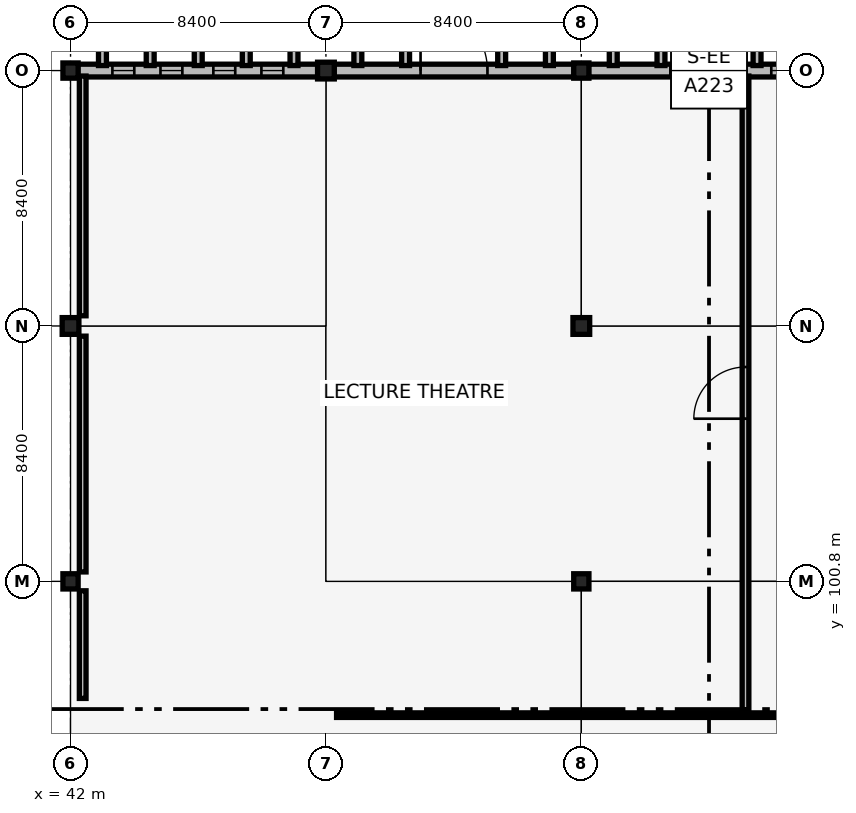
"""IFC4 building model, lengths in metres.
Left out: names, types, materials, properties, quantities, classifications, styles, units other than length and angle.
Written with IfcOpenShell. Run it as: python <this file> out.ifc"""

import sys

from ifc_helpers import new_model, si_unit, direction, frame, frame_2d, origin, origin_2d, place, context, subcontext, project, spatial, rectangle, extrude, element, fill, save


model = new_model("IFC4")
c1 = context("Model", 3, precision=1e-05, world=origin(), true_north=direction((0.0, 1.0)))
c2 = subcontext(c1, "Body", "Model", "MODEL_VIEW")
j1 = project(units=[si_unit("LENGTHUNIT", "METRE"), si_unit("PLANEANGLEUNIT", "RADIAN")], contexts=[c1])
p1 = place(None, origin())
s1 = spatial("IfcSite", under=j1, at=p1, CompositionType="ELEMENT")
p2 = place(p1, origin())
s2 = spatial("IfcBuilding", under=s1, at=p2, CompositionType="ELEMENT")
p3 = place(p2, origin())
s3 = spatial("IfcBuildingStorey", under=s2, at=p3, CompositionType="ELEMENT", Elevation=0.0)
p4 = place(p3, frame((42.0, 100.8, -0.32), z_axis=(0.0, 0.0, 1.0), x_axis=(1.0, 0.0, 0.0)))
e1 = element("IfcColumn", 1, at=p4, inside=s3, PredefinedType="COLUMN", context=c2, shape_type="SweptSolid", body=[
    extrude(rectangle(XDim=0.5, YDim=0.5, at=origin_2d()), origin(), (0.0, 0.0, 1.0), 5.46),
])
p5 = place(p3, frame((42.0, 109.2, -0.32), z_axis=(0.0, 0.0, 1.0), x_axis=(1.0, 0.0, 0.0)))
e2 = element("IfcColumn", 2, at=p5, inside=s3, PredefinedType="COLUMN", context=c2, shape_type="SweptSolid", body=[
    extrude(rectangle(XDim=0.55, YDim=0.55, at=origin_2d()), origin(), (0.0, 0.0, 1.0), 5.46),
])
p6 = place(p3, frame((42.0, 117.6, -0.32), z_axis=(0.0, 0.0, 1.0), x_axis=(1.0, 0.0, 0.0)))
e3 = element("IfcColumn", 3, at=p6, inside=s3, PredefinedType="COLUMN", context=c2, shape_type="SweptSolid", body=[
    extrude(rectangle(XDim=0.5, YDim=0.5, at=origin_2d()), origin(), (0.0, 0.0, 1.0), 5.46),
])
p7 = place(p3, frame((50.4, 117.6, -0.32), z_axis=(0.0, 0.0, 1.0), x_axis=(1.0, 0.0, 0.0)))
e4 = element("IfcColumn", 4, at=p7, inside=s3, PredefinedType="COLUMN", context=c2, shape_type="SweptSolid", body=[
    extrude(rectangle(XDim=0.55, YDim=0.55, at=origin_2d()), origin(), (0.0, 0.0, 1.0), 5.46),
])
p8 = place(p3, frame((58.8, 100.8, -0.32), z_axis=(0.0, 0.0, 1.0), x_axis=(1.0, 0.0, 0.0)))
e5 = element("IfcColumn", 5, at=p8, inside=s3, PredefinedType="COLUMN", context=c2, shape_type="SweptSolid", body=[
    extrude(rectangle(XDim=0.5, YDim=0.5, at=origin_2d()), origin(), (0.0, 0.0, 1.0), 5.46),
])
p9 = place(p3, frame((58.8, 109.2, -0.32), z_axis=(0.0, 0.0, 1.0), x_axis=(1.0, 0.0, 0.0)))
e6 = element("IfcColumn", 6, at=p9, inside=s3, PredefinedType="COLUMN", context=c2, shape_type="SweptSolid", body=[
    extrude(rectangle(XDim=0.55, YDim=0.55, at=origin_2d()), origin(), (0.0, 0.0, 1.0), 5.46),
])
p10 = place(p3, frame((58.8, 117.6, -0.32), z_axis=(0.0, 0.0, 1.0), x_axis=(1.0, 0.0, 0.0)))
e7 = element("IfcColumn", 7, at=p10, inside=s3, PredefinedType="COLUMN", context=c2, shape_type="SweptSolid", body=[
    extrude(rectangle(XDim=0.5, YDim=0.5, at=origin_2d()), origin(), (0.0, 0.0, 1.0), 5.46),
])
p11 = place(p3, frame((42.235, 117.6, 0.0), z_axis=(0.0, 0.0, 1.0), x_axis=(1.0, 0.0, 0.0)))
e8 = element("IfcWall", 8, at=p11, inside=s3, PredefinedType="SOLIDWALL", context=c2, shape_type="SweptSolid", body=[
    extrude(rectangle(XDim=7.905, YDim=0.42, at=frame_2d((3.952, 0.0))), origin(), (0.0, 0.0, 1.0), 4.4),
])
p12 = place(p11, frame((1.142, 0.0, 0.75)))
e9 = element("IfcOpeningElement", 9, at=p12, cuts=e8, PredefinedType="OPENING", context=c2, shape_type="SweptSolid", body=[
    extrude(rectangle(XDim=0.72, YDim=2.6, at=frame_2d((0.36, 1.3))), frame((0.0, 0.22, 0.0), z_axis=(0.0, -1.0, 0.0), x_axis=(1.0, 0.0, 0.0)), (0.0, 0.0, 1.0), 0.44),
])
p13 = place(p11, frame((2.723, 0.0, 0.75)))
e10 = element("IfcOpeningElement", 10, at=p13, cuts=e8, PredefinedType="OPENING", context=c2, shape_type="SweptSolid", body=[
    extrude(rectangle(XDim=0.72, YDim=2.6, at=frame_2d((0.36, 1.3))), frame((0.0, 0.22, 0.0), z_axis=(0.0, -1.0, 0.0), x_axis=(1.0, 0.0, 0.0)), (0.0, 0.0, 1.0), 0.44),
])
p14 = place(p11, frame((4.462, 0.0, 0.75)))
e11 = element("IfcOpeningElement", 11, at=p14, cuts=e8, PredefinedType="OPENING", context=c2, shape_type="SweptSolid", body=[
    extrude(rectangle(XDim=0.72, YDim=2.6, at=frame_2d((0.36, 1.3))), frame((0.0, 0.22, 0.0), z_axis=(0.0, -1.0, 0.0), x_axis=(1.0, 0.0, 0.0)), (0.0, 0.0, 1.0), 0.44),
])
p15 = place(p11, frame((6.043, 0.0, 0.75)))
e12 = element("IfcOpeningElement", 12, at=p15, cuts=e8, PredefinedType="OPENING", context=c2, shape_type="SweptSolid", body=[
    extrude(rectangle(XDim=0.72, YDim=2.6, at=frame_2d((0.36, 1.3))), frame((0.0, 0.22, 0.0), z_axis=(0.0, -1.0, 0.0), x_axis=(1.0, 0.0, 0.0)), (0.0, 0.0, 1.0), 0.44),
])
for number, where, z_axis, x_axis in (
    (13, (43.05, 117.765, -0.32), (0.0, 0.0, 1.0), (0.0, 1.0, 0.0)),
    (14, (44.62, 117.765, -0.32), (0.0, 0.0, 1.0), (0.0, 1.0, 0.0)),
    (15, (46.2, 117.765, -0.32), (0.0, 0.0, 1.0), (0.0, 1.0, 0.0)),
    (16, (47.78, 117.765, -0.32), (0.0, 0.0, 1.0), (0.0, 1.0, 0.0)),
    (17, (49.35, 117.765, -0.32), (0.0, 0.0, 1.0), (0.0, 1.0, 0.0)),
):
    element("IfcWall", number, at=place(p3, frame(where, z_axis=z_axis, x_axis=x_axis)), inside=s3, PredefinedType="SOLIDWALL", context=c2, shape_type="SweptSolid", body=[
        extrude(rectangle(XDim=0.7, YDim=0.26, at=frame_2d((0.35, 0.0))), origin(), (0.0, 0.0, 1.0), 5.76),
    ])
p16 = place(p3, frame((50.66, 117.6, 0.0), z_axis=(0.0, 0.0, 1.0), x_axis=(1.0, 0.0, 0.0)))
e18 = element("IfcWall", 18, at=p16, inside=s3, PredefinedType="SOLIDWALL", context=c2, shape_type="SweptSolid", body=[
    extrude(rectangle(XDim=7.905, YDim=0.42, at=frame_2d((3.953, 0.0))), origin(), (0.0, 0.0, 1.0), 4.4),
])
p17 = place(p16, frame((2.853, 0.0, 0.0)))
e19 = element("IfcOpeningElement", 19, at=p17, cuts=e18, PredefinedType="OPENING", context=c2, shape_type="SweptSolid", body=[
    extrude(rectangle(XDim=2.2, YDim=2.4, at=frame_2d((1.1, 1.2))), frame((0.0, 0.22, 0.0), z_axis=(0.0, -1.0, 0.0), x_axis=(1.0, 0.0, 0.0)), (0.0, 0.0, 1.0), 0.44),
])
for number, where, z_axis, x_axis in (
    (20, (51.45, 117.765, -0.32), (0.0, 0.0, 1.0), (0.0, 1.0, 0.0)),
    (21, (53.02, 117.765, -0.32), (0.0, 0.0, 1.0), (0.0, 1.0, 0.0)),
    (22, (56.18, 117.765, -0.32), (0.0, 0.0, 1.0), (0.0, 1.0, 0.0)),
    (23, (57.75, 117.765, -0.32), (0.0, 0.0, 1.0), (0.0, 1.0, 0.0)),
):
    element("IfcWall", number, at=place(p3, frame(where, z_axis=z_axis, x_axis=x_axis)), inside=s3, PredefinedType="SOLIDWALL", context=c2, shape_type="SweptSolid", body=[
        extrude(rectangle(XDim=0.7, YDim=0.26, at=frame_2d((0.35, 0.0))), origin(), (0.0, 0.0, 1.0), 5.76),
    ])
p18 = place(p3, frame((59.035, 117.6, 0.0), z_axis=(0.0, 0.0, 1.0), x_axis=(1.0, 0.0, 0.0)))
e24 = element("IfcWall", 24, at=p18, inside=s3, PredefinedType="SOLIDWALL", context=c2, shape_type="SweptSolid", body=[
    extrude(rectangle(XDim=7.905, YDim=0.42, at=frame_2d((3.953, 0.0))), origin(), (0.0, 0.0, 1.0), 4.4),
])
p19 = place(p18, frame((2.693, 0.0, 0.75)))
e25 = element("IfcOpeningElement", 25, at=p19, cuts=e24, PredefinedType="OPENING", context=c2, shape_type="SweptSolid", body=[
    extrude(rectangle(XDim=0.78, YDim=2.7, at=frame_2d((0.39, 1.35))), frame((0.0, 0.22, 0.0), z_axis=(0.0, -1.0, 0.0), x_axis=(1.0, 0.0, 0.0)), (0.0, 0.0, 1.0), 0.44),
])
p20 = place(p18, frame((6.013, 0.0, 0.75)))
e26 = element("IfcOpeningElement", 26, at=p20, cuts=e24, PredefinedType="OPENING", context=c2, shape_type="SweptSolid", body=[
    extrude(rectangle(XDim=0.78, YDim=2.7, at=frame_2d((0.39, 1.35))), frame((0.0, 0.22, 0.0), z_axis=(0.0, -1.0, 0.0), x_axis=(1.0, 0.0, 0.0)), (0.0, 0.0, 1.0), 0.44),
])
for number, where, z_axis, x_axis in (
    (27, (59.85, 117.765, -0.32), (0.0, 0.0, 1.0), (0.0, 1.0, 0.0)),
    (28, (61.42, 117.765, -0.32), (0.0, 0.0, 1.0), (0.0, 1.0, 0.0)),
    (29, (63.0, 117.765, -0.32), (0.0, 0.0, 1.0), (0.0, 1.0, 0.0)),
    (30, (64.58, 117.765, -0.32), (0.0, 0.0, 1.0), (0.0, 1.0, 0.0)),
):
    element("IfcWall", number, at=place(p3, frame(where, z_axis=z_axis, x_axis=x_axis)), inside=s3, PredefinedType="SOLIDWALL", context=c2, shape_type="SweptSolid", body=[
        extrude(rectangle(XDim=0.7, YDim=0.26, at=frame_2d((0.35, 0.0))), origin(), (0.0, 0.0, 1.0), 5.76),
    ])
p21 = place(p3, frame((50.75, 96.4, 0.0), z_axis=(0.0, 0.0, 1.0), x_axis=(1.0, 0.0, 0.0)))
e31 = element("IfcWall", 31, at=p21, inside=s3, PredefinedType="PARTITIONING", context=c2, shape_type="SweptSolid", body=[
    extrude(rectangle(XDim=20.3, YDim=0.15, at=frame_2d((10.15, 0.0))), origin(), (0.0, 0.0, 1.0), 4.74),
])
p22 = place(p3, frame((42.4, 96.95, 0.0), z_axis=(0.0, 0.0, 1.0), x_axis=(0.0, 1.0, 0.0)))
e32 = element("IfcWall", 32, at=p22, inside=s3, PredefinedType="PARTITIONING", context=c2, shape_type="SweptSolid", body=[
    extrude(rectangle(XDim=3.54, YDim=0.22, at=frame_2d((1.77, 0.0))), origin(), (0.0, 0.0, 1.0), 3.74),
])
p23 = place(p3, frame((42.4, 101.11, 0.0), z_axis=(0.0, 0.0, 1.0), x_axis=(0.0, 1.0, 0.0)))
e33 = element("IfcWall", 33, at=p23, inside=s3, PredefinedType="PARTITIONING", context=c2, shape_type="SweptSolid", body=[
    extrude(rectangle(XDim=7.755, YDim=0.22, at=frame_2d((3.877, 0.0))), origin(), (0.0, 0.0, 1.0), 3.74),
])
p24 = place(p3, frame((42.4, 109.535, 0.0), z_axis=(0.0, 0.0, 1.0), x_axis=(0.0, 1.0, 0.0)))
e34 = element("IfcWall", 34, at=p24, inside=s3, PredefinedType="PARTITIONING", context=c2, shape_type="SweptSolid", body=[
    extrude(rectangle(XDim=7.885, YDim=0.22, at=frame_2d((3.942, 0.0))), origin(), (0.0, 0.0, 1.0), 3.74),
])
p25 = place(p3, frame((64.2, 96.58, 0.0), z_axis=(0.0, 0.0, 1.0), x_axis=(0.0, 1.0, 0.0)))
e35 = element("IfcWall", 35, at=p25, inside=s3, PredefinedType="PARTITIONING", context=c2, shape_type="SweptSolid", body=[
    extrude(rectangle(XDim=20.84, YDim=0.22, at=frame_2d((10.42, 0.0))), origin(), (0.0, 0.0, 1.0), 3.74),
])
p26 = place(p25, frame((9.57, 0.0, 0.0)))
e36 = element("IfcOpeningElement", 36, at=p26, cuts=e35, PredefinedType="OPENING", context=c2, shape_type="SweptSolid", body=[
    extrude(rectangle(XDim=1.7, YDim=2.25, at=frame_2d((0.85, 1.125))), frame((0.0, 0.12, 0.0), z_axis=(0.0, -1.0, 0.0), x_axis=(1.0, 0.0, 0.0)), (0.0, 0.0, 1.0), 0.24),
])
p27 = place(p12, origin())
e37 = element("IfcWindow", 37, at=p27, inside=s3, PartitioningType="DOUBLE_PANEL_VERTICAL", PredefinedType="WINDOW", context=c2, shape_type="SweptSolid", body=[
    extrude(rectangle(XDim=0.72, YDim=2.6, at=frame_2d((0.36, 1.3))), frame((0.0, 0.03, 0.0), z_axis=(0.0, -1.0, 0.0), x_axis=(1.0, 0.0, 0.0)), (0.0, 0.0, 1.0), 0.06),
])
fill(e9, e37)
p28 = place(p13, origin())
e38 = element("IfcWindow", 38, at=p28, inside=s3, PartitioningType="DOUBLE_PANEL_VERTICAL", PredefinedType="WINDOW", context=c2, shape_type="SweptSolid", body=[
    extrude(rectangle(XDim=0.72, YDim=2.6, at=frame_2d((0.36, 1.3))), frame((0.0, 0.03, 0.0), z_axis=(0.0, -1.0, 0.0), x_axis=(1.0, 0.0, 0.0)), (0.0, 0.0, 1.0), 0.06),
])
fill(e10, e38)
p29 = place(p14, origin())
e39 = element("IfcWindow", 39, at=p29, inside=s3, PartitioningType="DOUBLE_PANEL_VERTICAL", PredefinedType="WINDOW", context=c2, shape_type="SweptSolid", body=[
    extrude(rectangle(XDim=0.72, YDim=2.6, at=frame_2d((0.36, 1.3))), frame((0.0, 0.03, 0.0), z_axis=(0.0, -1.0, 0.0), x_axis=(1.0, 0.0, 0.0)), (0.0, 0.0, 1.0), 0.06),
])
fill(e11, e39)
p30 = place(p15, origin())
e40 = element("IfcWindow", 40, at=p30, inside=s3, PartitioningType="DOUBLE_PANEL_VERTICAL", PredefinedType="WINDOW", context=c2, shape_type="SweptSolid", body=[
    extrude(rectangle(XDim=0.72, YDim=2.6, at=frame_2d((0.36, 1.3))), frame((0.0, 0.03, 0.0), z_axis=(0.0, -1.0, 0.0), x_axis=(1.0, 0.0, 0.0)), (0.0, 0.0, 1.0), 0.06),
])
fill(e12, e40)
p31 = place(p17, origin())
e41 = element("IfcDoor", 41, at=p31, inside=s3, OperationType="DOUBLE_DOOR_SINGLE_SWING", PredefinedType="DOOR", context=c2, shape_type="SweptSolid", body=[
    extrude(rectangle(XDim=2.2, YDim=2.4, at=frame_2d((1.1, 1.2))), frame((0.0, 0.025, 0.0), z_axis=(0.0, -1.0, 0.0), x_axis=(1.0, 0.0, 0.0)), (0.0, 0.0, 1.0), 0.05),
])
fill(e19, e41)
p32 = place(p19, origin())
e42 = element("IfcWindow", 42, at=p32, inside=s3, PartitioningType="DOUBLE_PANEL_VERTICAL", PredefinedType="WINDOW", context=c2, shape_type="SweptSolid", body=[
    extrude(rectangle(XDim=0.78, YDim=2.7, at=frame_2d((0.39, 1.35))), frame((0.0, 0.03, 0.0), z_axis=(0.0, -1.0, 0.0), x_axis=(1.0, 0.0, 0.0)), (0.0, 0.0, 1.0), 0.06),
])
fill(e25, e42)
p33 = place(p20, origin())
e43 = element("IfcWindow", 43, at=p33, inside=s3, PartitioningType="DOUBLE_PANEL_VERTICAL", PredefinedType="WINDOW", context=c2, shape_type="SweptSolid", body=[
    extrude(rectangle(XDim=0.78, YDim=2.7, at=frame_2d((0.39, 1.35))), frame((0.0, 0.03, 0.0), z_axis=(0.0, -1.0, 0.0), x_axis=(1.0, 0.0, 0.0)), (0.0, 0.0, 1.0), 0.06),
])
fill(e26, e43)
p34 = place(p26, origin())
e44 = element("IfcDoor", 44, at=p34, inside=s3, OperationType="DOUBLE_DOOR_SINGLE_SWING", PredefinedType="DOOR", context=c2, shape_type="SweptSolid", body=[
    extrude(rectangle(XDim=1.7, YDim=2.25, at=frame_2d((0.85, 1.125))), frame((0.0, 0.025, 0.0), z_axis=(0.0, -1.0, 0.0), x_axis=(1.0, 0.0, 0.0)), (0.0, 0.0, 1.0), 0.05),
])
fill(e36, e44)
save(model, sys.argv[1])
